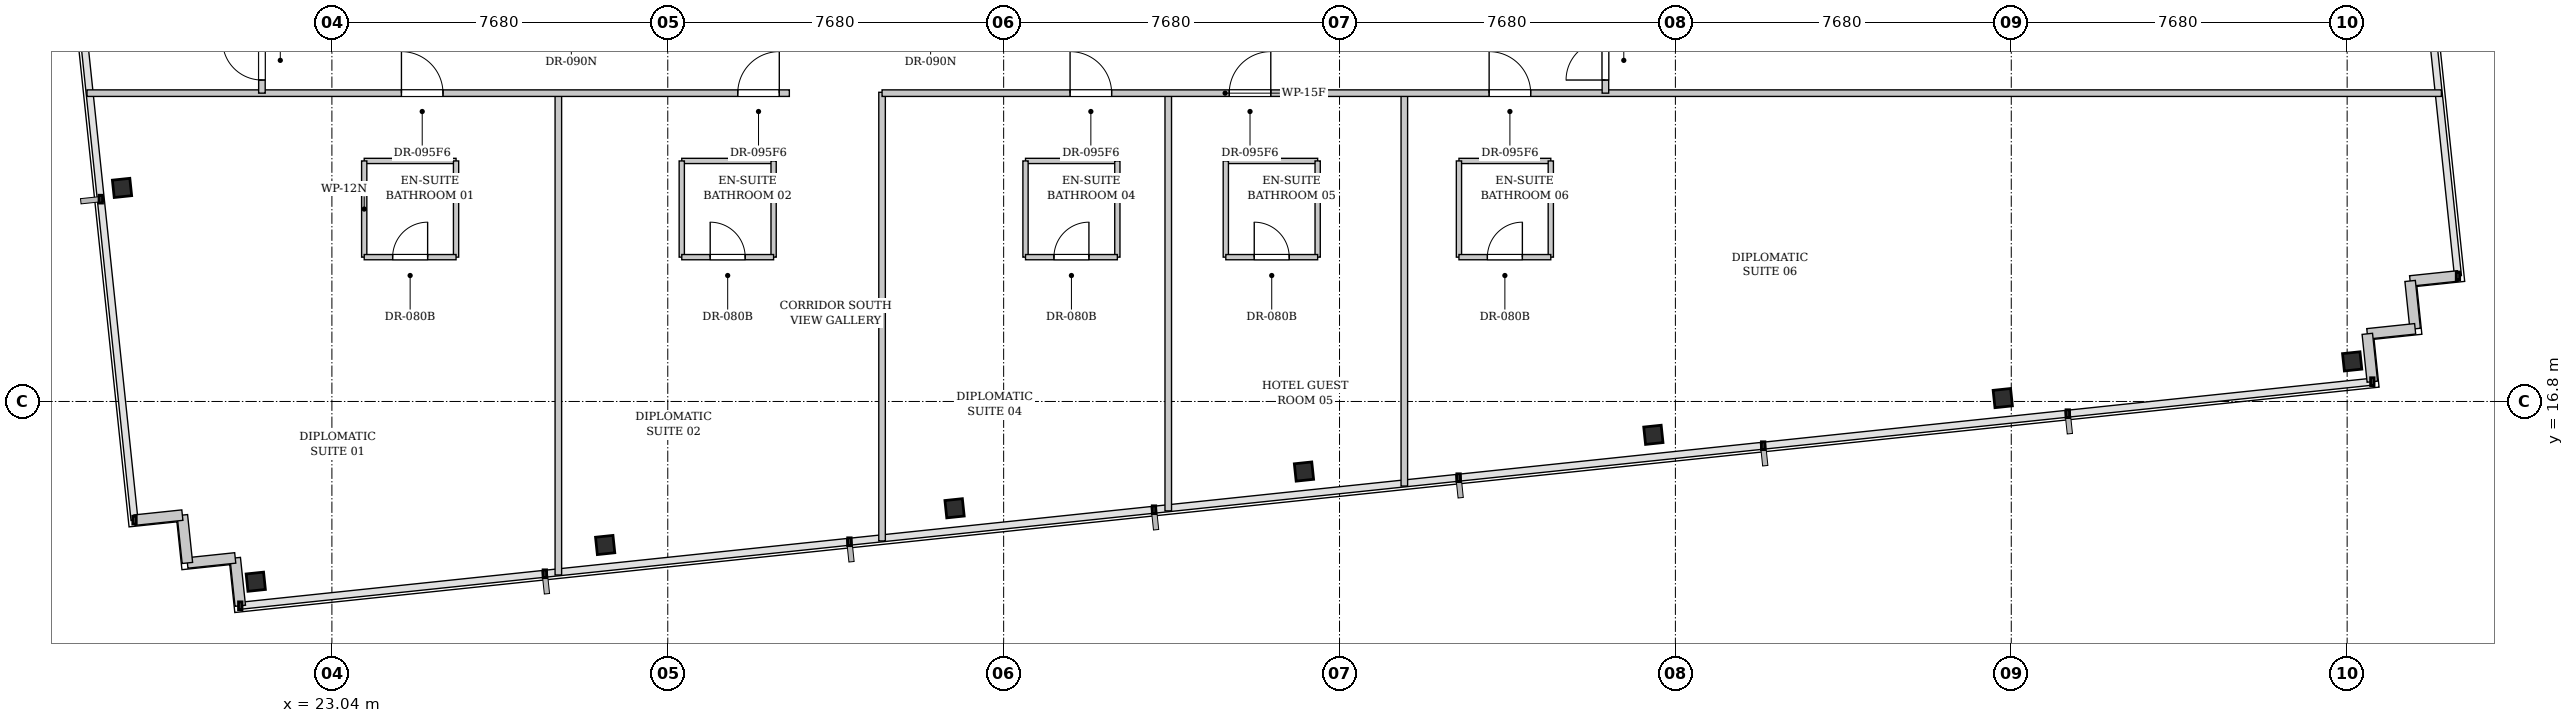
"""IFC4 building model, lengths in metres.
Left out: names, types, materials, properties, quantities, classifications, styles, units other than length and angle.
Written with IfcOpenShell. Run it as: python <this file> out.ifc"""

import sys

from ifc_helpers import new_model, si_unit, direction, frame, frame_2d, origin, origin_2d, place, context, subcontext, project, spatial, rectangle, i_section, extrude, element, fill, save


model = new_model("IFC4")
c1 = context("Model", 3, precision=1e-05, world=origin(), true_north=direction((0.0, 1.0)))
c2 = subcontext(c1, "Body", "Model", "MODEL_VIEW")
j1 = project(units=[si_unit("LENGTHUNIT", "METRE"), si_unit("PLANEANGLEUNIT", "RADIAN")], contexts=[c1])
p1 = place(None, origin())
s1 = spatial("IfcSite", under=j1, at=p1, CompositionType="ELEMENT")
p2 = place(p1, origin())
s2 = spatial("IfcBuilding", under=s1, at=p2, CompositionType="ELEMENT")
p3 = place(p2, frame((0.0, 0.0, 221.0)))
s3 = spatial("IfcBuildingStorey", under=s2, at=p3, CompositionType="ELEMENT", Elevation=221.0)
for number, where, z_axis, x_axis in (
    (1, (21.299, 12.678, 0.0), (0.0, 0.0, 1.0), (0.995, 0.105, 0.0)),
    (2, (29.288, 13.518, 0.0), (0.0, 0.0, 1.0), (0.995, 0.105, 0.0)),
    (3, (37.278, 14.358, 0.0), (0.0, 0.0, 1.0), (0.995, 0.105, 0.0)),
    (4, (45.267, 15.198, 0.0), (0.0, 0.0, 1.0), (0.995, 0.105, 0.0)),
    (5, (53.256, 16.037, 0.0), (0.0, 0.0, 1.0), (0.995, 0.105, 0.0)),
    (6, (61.246, 16.877, 0.0), (0.0, 0.0, 1.0), (0.995, 0.105, 0.0)),
    (7, (69.235, 17.717, 0.0), (0.0, 0.0, 1.0), (0.995, 0.105, 0.0)),
    (8, (18.241, 21.683, 0.0), (0.0, 0.0, 1.0), (0.995, 0.105, 0.0)),
):
    element("IfcColumn", number, at=place(p3, frame(where, z_axis=z_axis, x_axis=x_axis)), inside=s3, PredefinedType="COLUMN", context=c2, shape_type="SweptSolid", body=[
        extrude(i_section(OverallWidth=0.401, OverallDepth=0.399, WebThickness=0.025, FlangeThickness=0.04, FilletRadius=0.015, at=origin_2d()), origin(), (0.0, 0.0, 1.0), 3.3),
    ])
for number, where, z_axis, x_axis in (
    (9, (20.945, 12.128, 0.0), (0.0, 0.0, 1.0), (-0.105, 0.995, 0.0)),
    (10, (20.83, 13.222, 0.0), (0.0, 0.0, 1.0), (-0.995, -0.105, 0.0)),
    (11, (19.736, 13.107, 0.0), (0.0, 0.0, 1.0), (-0.105, 0.995, 0.0)),
    (12, (19.621, 14.201, 0.0), (0.0, 0.0, 1.0), (-0.995, -0.105, 0.0)),
    (13, (71.654, 19.67, 0.0), (0.0, 0.0, 1.0), (-0.995, -0.105, 0.0)),
    (14, (70.56, 19.555, 0.0), (0.0, 0.0, 1.0), (0.105, -0.995, 0.0)),
    (15, (70.675, 18.461, 0.0), (0.0, 0.0, 1.0), (-0.995, -0.105, 0.0)),
    (16, (69.581, 18.346, 0.0), (0.0, 0.0, 1.0), (0.105, -0.995, 0.0)),
):
    element("IfcWall", number, at=place(p3, frame(where, z_axis=z_axis, x_axis=x_axis)), inside=s3, PredefinedType="SOLIDWALL", context=c2, shape_type="SweptSolid", body=[
        extrude(rectangle(XDim=1.1, YDim=0.24, at=frame_2d((0.55, 0.0))), origin(), (0.0, 0.0, 1.0), 3.08),
    ])
p4 = place(p3, frame((23.779, 22.3, 0.0), z_axis=(0.0, 0.0, 1.0), x_axis=(1.0, 0.0, 0.0)))
e17 = element("IfcWall", 17, at=p4, inside=s3, PredefinedType="PARTITIONING", context=c2, shape_type="SweptSolid", body=[
    extrude(rectangle(XDim=2.1, YDim=0.12, at=frame_2d((1.05, 0.0))), origin(), (0.0, 0.0, 1.0), 3.08),
])
for number, where, z_axis, x_axis in (
    (18, (23.779, 20.1, 0.0), (0.0, 0.0, 1.0), (0.0, 1.0, 0.0)),
    (19, (25.879, 20.1, 0.0), (0.0, 0.0, 1.0), (0.0, 1.0, 0.0)),
):
    element("IfcWall", number, at=place(p3, frame(where, z_axis=z_axis, x_axis=x_axis)), inside=s3, PredefinedType="PARTITIONING", context=c2, shape_type="SweptSolid", body=[
        extrude(rectangle(XDim=2.2, YDim=0.12, at=frame_2d((1.1, 0.0))), origin(), (0.0, 0.0, 1.0), 3.08),
    ])
p5 = place(p3, frame((23.779, 20.1, 0.0), z_axis=(0.0, 0.0, 1.0), x_axis=(1.0, 0.0, 0.0)))
e20 = element("IfcWall", 20, at=p5, inside=s3, PredefinedType="PARTITIONING", context=c2, shape_type="SweptSolid", body=[
    extrude(rectangle(XDim=2.1, YDim=0.12, at=frame_2d((1.05, 0.0))), origin(), (0.0, 0.0, 1.0), 3.08),
])
p6 = place(p5, frame((0.65, 0.0, 0.0)))
e21 = element("IfcOpeningElement", 21, at=p6, cuts=e20, PredefinedType="OPENING", context=c2, shape_type="SweptSolid", body=[
    extrude(rectangle(XDim=0.8, YDim=2.1, at=frame_2d((0.4, 1.05))), frame((0.0, 0.07, 0.0), z_axis=(0.0, -1.0, 0.0), x_axis=(1.0, 0.0, 0.0)), (0.0, 0.0, 1.0), 0.14),
])
p7 = place(p3, frame((31.04, 22.3, 0.0), z_axis=(0.0, 0.0, 1.0), x_axis=(1.0, 0.0, 0.0)))
e22 = element("IfcWall", 22, at=p7, inside=s3, PredefinedType="PARTITIONING", context=c2, shape_type="SweptSolid", body=[
    extrude(rectangle(XDim=2.1, YDim=0.12, at=frame_2d((1.05, 0.0))), origin(), (0.0, 0.0, 1.0), 3.08),
])
for number, where, z_axis, x_axis in (
    (23, (31.04, 20.1, 0.0), (0.0, 0.0, 1.0), (0.0, 1.0, 0.0)),
    (24, (33.14, 20.1, 0.0), (0.0, 0.0, 1.0), (0.0, 1.0, 0.0)),
):
    element("IfcWall", number, at=place(p3, frame(where, z_axis=z_axis, x_axis=x_axis)), inside=s3, PredefinedType="PARTITIONING", context=c2, shape_type="SweptSolid", body=[
        extrude(rectangle(XDim=2.2, YDim=0.12, at=frame_2d((1.1, 0.0))), origin(), (0.0, 0.0, 1.0), 3.08),
    ])
p8 = place(p3, frame((31.04, 20.1, 0.0), z_axis=(0.0, 0.0, 1.0), x_axis=(1.0, 0.0, 0.0)))
e25 = element("IfcWall", 25, at=p8, inside=s3, PredefinedType="PARTITIONING", context=c2, shape_type="SweptSolid", body=[
    extrude(rectangle(XDim=2.1, YDim=0.12, at=frame_2d((1.05, 0.0))), origin(), (0.0, 0.0, 1.0), 3.08),
])
p9 = place(p8, frame((0.65, 0.0, 0.0)))
e26 = element("IfcOpeningElement", 26, at=p9, cuts=e25, PredefinedType="OPENING", context=c2, shape_type="SweptSolid", body=[
    extrude(rectangle(XDim=0.8, YDim=2.1, at=frame_2d((0.4, 1.05))), frame((0.0, 0.07, 0.0), z_axis=(0.0, -1.0, 0.0), x_axis=(1.0, 0.0, 0.0)), (0.0, 0.0, 1.0), 0.14),
])
p10 = place(p3, frame((28.218, 12.833, 0.0), z_axis=(0.0, 0.0, 1.0), x_axis=(0.0, 1.0, 0.0)))
e27 = element("IfcWall", 27, at=p10, inside=s3, PredefinedType="PARTITIONING", context=c2, shape_type="SweptSolid", body=[
    extrude(rectangle(XDim=11.038, YDim=0.15, at=frame_2d((5.519, 0.0))), origin(), (0.0, 0.0, 1.0), 3.08),
])
p11 = place(p3, frame((38.9, 22.3, 0.0), z_axis=(0.0, 0.0, 1.0), x_axis=(1.0, 0.0, 0.0)))
e28 = element("IfcWall", 28, at=p11, inside=s3, PredefinedType="PARTITIONING", context=c2, shape_type="SweptSolid", body=[
    extrude(rectangle(XDim=2.1, YDim=0.12, at=frame_2d((1.05, 0.0))), origin(), (0.0, 0.0, 1.0), 3.08),
])
for number, where, z_axis, x_axis in (
    (29, (38.9, 20.1, 0.0), (0.0, 0.0, 1.0), (0.0, 1.0, 0.0)),
    (30, (41.0, 20.1, 0.0), (0.0, 0.0, 1.0), (0.0, 1.0, 0.0)),
):
    element("IfcWall", number, at=place(p3, frame(where, z_axis=z_axis, x_axis=x_axis)), inside=s3, PredefinedType="PARTITIONING", context=c2, shape_type="SweptSolid", body=[
        extrude(rectangle(XDim=2.2, YDim=0.12, at=frame_2d((1.1, 0.0))), origin(), (0.0, 0.0, 1.0), 3.08),
    ])
p12 = place(p3, frame((38.9, 20.1, 0.0), z_axis=(0.0, 0.0, 1.0), x_axis=(1.0, 0.0, 0.0)))
e31 = element("IfcWall", 31, at=p12, inside=s3, PredefinedType="PARTITIONING", context=c2, shape_type="SweptSolid", body=[
    extrude(rectangle(XDim=2.1, YDim=0.12, at=frame_2d((1.05, 0.0))), origin(), (0.0, 0.0, 1.0), 3.08),
])
p13 = place(p12, frame((0.65, 0.0, 0.0)))
e32 = element("IfcOpeningElement", 32, at=p13, cuts=e31, PredefinedType="OPENING", context=c2, shape_type="SweptSolid", body=[
    extrude(rectangle(XDim=0.8, YDim=2.1, at=frame_2d((0.4, 1.05))), frame((0.0, 0.07, 0.0), z_axis=(0.0, -1.0, 0.0), x_axis=(1.0, 0.0, 0.0)), (0.0, 0.0, 1.0), 0.14),
])
p14 = place(p3, frame((35.62, 13.611, 0.0), z_axis=(0.0, 0.0, 1.0), x_axis=(0.0, 1.0, 0.0)))
e33 = element("IfcWall", 33, at=p14, inside=s3, PredefinedType="PARTITIONING", context=c2, shape_type="SweptSolid", body=[
    extrude(rectangle(XDim=10.26, YDim=0.15, at=frame_2d((5.13, 0.0))), origin(), (0.0, 0.0, 1.0), 3.08),
])
p15 = place(p3, frame((43.48, 22.3, 0.0), z_axis=(0.0, 0.0, 1.0), x_axis=(1.0, 0.0, 0.0)))
e34 = element("IfcWall", 34, at=p15, inside=s3, PredefinedType="PARTITIONING", context=c2, shape_type="SweptSolid", body=[
    extrude(rectangle(XDim=2.1, YDim=0.12, at=frame_2d((1.05, 0.0))), origin(), (0.0, 0.0, 1.0), 3.08),
])
p16 = place(p3, frame((43.48, 20.1, 0.0), z_axis=(0.0, 0.0, 1.0), x_axis=(0.0, 1.0, 0.0)))
e35 = element("IfcWall", 35, at=p16, inside=s3, PredefinedType="PARTITIONING", context=c2, shape_type="SweptSolid", body=[
    extrude(rectangle(XDim=2.2, YDim=0.12, at=frame_2d((1.1, 0.0))), origin(), (0.0, 0.0, 1.0), 3.08),
])
p17 = place(p3, frame((45.58, 20.1, 0.0), z_axis=(0.0, 0.0, 1.0), x_axis=(0.0, 1.0, 0.0)))
e36 = element("IfcWall", 36, at=p17, inside=s3, PredefinedType="PARTITIONING", context=c2, shape_type="SweptSolid", body=[
    extrude(rectangle(XDim=2.2, YDim=0.12, at=frame_2d((1.1, 0.0))), origin(), (0.0, 0.0, 1.0), 2.313),
])
p18 = place(p3, frame((43.48, 20.1, 0.0), z_axis=(0.0, 0.0, 1.0), x_axis=(1.0, 0.0, 0.0)))
e37 = element("IfcWall", 37, at=p18, inside=s3, PredefinedType="PARTITIONING", context=c2, shape_type="SweptSolid", body=[
    extrude(rectangle(XDim=2.1, YDim=0.12, at=frame_2d((1.05, 0.0))), origin(), (0.0, 0.0, 1.0), 3.08),
])
p19 = place(p18, frame((0.65, 0.0, 0.0)))
e38 = element("IfcOpeningElement", 38, at=p19, cuts=e37, PredefinedType="OPENING", context=c2, shape_type="SweptSolid", body=[
    extrude(rectangle(XDim=0.8, YDim=2.1, at=frame_2d((0.4, 1.05))), frame((0.0, 0.07, 0.0), z_axis=(0.0, -1.0, 0.0), x_axis=(1.0, 0.0, 0.0)), (0.0, 0.0, 1.0), 0.14),
])
p20 = place(p3, frame((42.164, 14.298, 0.0), z_axis=(0.0, 0.0, 1.0), x_axis=(0.0, 1.0, 0.0)))
e39 = element("IfcWall", 39, at=p20, inside=s3, PredefinedType="PARTITIONING", context=c2, shape_type="SweptSolid", body=[
    extrude(rectangle(XDim=9.572, YDim=0.15, at=frame_2d((4.786, 0.0))), origin(), (0.0, 0.0, 1.0), 3.08),
])
p21 = place(p3, frame((48.811, 22.3, 0.0), z_axis=(0.0, 0.0, 1.0), x_axis=(1.0, 0.0, 0.0)))
e40 = element("IfcWall", 40, at=p21, inside=s3, PredefinedType="PARTITIONING", context=c2, shape_type="SweptSolid", body=[
    extrude(rectangle(XDim=2.1, YDim=0.12, at=frame_2d((1.05, 0.0))), origin(), (0.0, 0.0, 1.0), 3.08),
])
for number, where, z_axis, x_axis in (
    (41, (48.811, 20.1, 0.0), (0.0, 0.0, 1.0), (0.0, 1.0, 0.0)),
    (42, (50.911, 20.1, 0.0), (0.0, 0.0, 1.0), (0.0, 1.0, 0.0)),
):
    element("IfcWall", number, at=place(p3, frame(where, z_axis=z_axis, x_axis=x_axis)), inside=s3, PredefinedType="PARTITIONING", context=c2, shape_type="SweptSolid", body=[
        extrude(rectangle(XDim=2.2, YDim=0.12, at=frame_2d((1.1, 0.0))), origin(), (0.0, 0.0, 1.0), 3.08),
    ])
p22 = place(p3, frame((48.811, 20.1, 0.0), z_axis=(0.0, 0.0, 1.0), x_axis=(1.0, 0.0, 0.0)))
e43 = element("IfcWall", 43, at=p22, inside=s3, PredefinedType="PARTITIONING", context=c2, shape_type="SweptSolid", body=[
    extrude(rectangle(XDim=2.1, YDim=0.12, at=frame_2d((1.05, 0.0))), origin(), (0.0, 0.0, 1.0), 3.08),
])
p23 = place(p22, frame((0.65, 0.0, 0.0)))
e44 = element("IfcOpeningElement", 44, at=p23, cuts=e43, PredefinedType="OPENING", context=c2, shape_type="SweptSolid", body=[
    extrude(rectangle(XDim=0.8, YDim=2.1, at=frame_2d((0.4, 1.05))), frame((0.0, 0.07, 0.0), z_axis=(0.0, -1.0, 0.0), x_axis=(1.0, 0.0, 0.0)), (0.0, 0.0, 1.0), 0.14),
])
p24 = place(p3, frame((47.562, 14.866, 0.0), z_axis=(0.0, 0.0, 1.0), x_axis=(0.0, 1.0, 0.0)))
e45 = element("IfcWall", 45, at=p24, inside=s3, PredefinedType="PARTITIONING", context=c2, shape_type="SweptSolid", body=[
    extrude(rectangle(XDim=9.004, YDim=0.15, at=frame_2d((4.502, 0.0))), origin(), (0.0, 0.0, 1.0), 3.08),
])
p25 = place(p3, frame((17.44, 23.85, 0.0), z_axis=(0.0, 0.0, 1.0), x_axis=(1.0, 0.0, 0.0)))
e46 = element("IfcWall", 46, at=p25, inside=s3, PredefinedType="PARTITIONING", context=c2, shape_type="SweptSolid", body=[
    extrude(rectangle(XDim=16.06, YDim=0.15, at=frame_2d((8.03, 0.0))), origin(), (0.0, 0.0, 1.0), 3.08),
])
p26 = place(p25, frame((7.19, 0.0, 0.0)))
e47 = element("IfcOpeningElement", 47, at=p26, cuts=e46, PredefinedType="OPENING", context=c2, shape_type="SweptSolid", body=[
    extrude(rectangle(XDim=0.95, YDim=2.15, at=frame_2d((0.475, 1.075))), frame((0.0, 0.085, 0.0), z_axis=(0.0, -1.0, 0.0), x_axis=(1.0, 0.0, 0.0)), (0.0, 0.0, 1.0), 0.17),
])
p27 = place(p25, frame((14.88, 0.0, 0.0)))
e48 = element("IfcOpeningElement", 48, at=p27, cuts=e46, PredefinedType="OPENING", context=c2, shape_type="SweptSolid", body=[
    extrude(rectangle(XDim=0.95, YDim=2.15, at=frame_2d((0.475, 1.075))), frame((0.0, 0.085, 0.0), z_axis=(0.0, -1.0, 0.0), x_axis=(1.0, 0.0, 0.0)), (0.0, 0.0, 1.0), 0.17),
])
p28 = place(p3, frame((35.62, 23.85, 0.0), z_axis=(0.0, 0.0, 1.0), x_axis=(1.0, 0.0, 0.0)))
e49 = element("IfcWall", 49, at=p28, inside=s3, PredefinedType="PARTITIONING", context=c2, shape_type="SweptSolid", body=[
    extrude(rectangle(XDim=35.655, YDim=0.15, at=frame_2d((17.828, 0.0))), origin(), (0.0, 0.0, 1.0), 3.08),
])
p29 = place(p28, frame((4.299, 0.0, 0.0)))
e50 = element("IfcOpeningElement", 50, at=p29, cuts=e49, PredefinedType="OPENING", context=c2, shape_type="SweptSolid", body=[
    extrude(rectangle(XDim=0.95, YDim=2.15, at=frame_2d((0.475, 1.075))), frame((0.0, 0.085, 0.0), z_axis=(0.0, -1.0, 0.0), x_axis=(1.0, 0.0, 0.0)), (0.0, 0.0, 1.0), 0.17),
])
p30 = place(p28, frame((7.938, 0.0, 0.0)))
e51 = element("IfcOpeningElement", 51, at=p30, cuts=e49, PredefinedType="OPENING", context=c2, shape_type="SweptSolid", body=[
    extrude(rectangle(XDim=0.95, YDim=2.15, at=frame_2d((0.475, 1.075))), frame((0.0, 0.085, 0.0), z_axis=(0.0, -1.0, 0.0), x_axis=(1.0, 0.0, 0.0)), (0.0, 0.0, 1.0), 0.17),
])
p31 = place(p28, frame((13.881, 0.0, 0.0)))
e52 = element("IfcOpeningElement", 52, at=p31, cuts=e49, PredefinedType="OPENING", context=c2, shape_type="SweptSolid", body=[
    extrude(rectangle(XDim=0.95, YDim=2.15, at=frame_2d((0.475, 1.075))), frame((0.0, 0.085, 0.0), z_axis=(0.0, -1.0, 0.0), x_axis=(1.0, 0.0, 0.0)), (0.0, 0.0, 1.0), 0.17),
])
p32 = place(p3, frame((21.44, 23.85, 0.0), z_axis=(0.0, 0.0, 1.0), x_axis=(0.0, 1.0, 0.0)))
e53 = element("IfcWall", 53, at=p32, inside=s3, PredefinedType="PARTITIONING", context=c2, shape_type="SweptSolid", body=[
    extrude(rectangle(XDim=22.498, YDim=0.15, at=frame_2d((11.249, 0.0))), origin(), (0.0, 0.0, 1.0), 3.08),
])
p33 = place(p32, frame((0.3, 0.0, 0.0)))
e54 = element("IfcOpeningElement", 54, at=p33, cuts=e53, PredefinedType="OPENING", context=c2, shape_type="SweptSolid", body=[
    extrude(rectangle(XDim=0.9, YDim=2.15, at=frame_2d((0.45, 1.075))), frame((0.0, 0.085, 0.0), z_axis=(0.0, -1.0, 0.0), x_axis=(1.0, 0.0, 0.0)), (0.0, 0.0, 1.0), 0.17),
])
p34 = place(p3, frame((52.16, 23.85, 0.0), z_axis=(0.0, 0.0, 1.0), x_axis=(0.0, 1.0, 0.0)))
e55 = element("IfcWall", 55, at=p34, inside=s3, PredefinedType="PARTITIONING", context=c2, shape_type="SweptSolid", body=[
    extrude(rectangle(XDim=11.29, YDim=0.15, at=frame_2d((5.645, 0.0))), origin(), (0.0, 0.0, 1.0), 3.08),
])
p35 = place(p34, frame((0.3, 0.0, 0.0)))
e56 = element("IfcOpeningElement", 56, at=p35, cuts=e55, PredefinedType="OPENING", context=c2, shape_type="SweptSolid", body=[
    extrude(rectangle(XDim=0.9, YDim=2.15, at=frame_2d((0.45, 1.075))), frame((0.0, 0.085, 0.0), z_axis=(0.0, -1.0, 0.0), x_axis=(1.0, 0.0, 0.0)), (0.0, 0.0, 1.0), 0.17),
])
p36 = place(p6, origin())
e57 = element("IfcDoor", 57, at=p36, inside=s3, OperationType="SINGLE_SWING_RIGHT", PredefinedType="DOOR", context=c2, shape_type="SweptSolid", body=[
    extrude(rectangle(XDim=0.8, YDim=2.1, at=frame_2d((0.4, 1.05))), frame((0.0, 0.025, 0.0), z_axis=(0.0, -1.0, 0.0), x_axis=(1.0, 0.0, 0.0)), (0.0, 0.0, 1.0), 0.05),
])
fill(e21, e57)
p37 = place(p9, origin())
e58 = element("IfcDoor", 58, at=p37, inside=s3, OperationType="SINGLE_SWING_LEFT", PredefinedType="DOOR", context=c2, shape_type="SweptSolid", body=[
    extrude(rectangle(XDim=0.8, YDim=2.1, at=frame_2d((0.4, 1.05))), frame((0.0, 0.025, 0.0), z_axis=(0.0, -1.0, 0.0), x_axis=(1.0, 0.0, 0.0)), (0.0, 0.0, 1.0), 0.05),
])
fill(e26, e58)
p38 = place(p13, origin())
e59 = element("IfcDoor", 59, at=p38, inside=s3, OperationType="SINGLE_SWING_RIGHT", PredefinedType="DOOR", context=c2, shape_type="SweptSolid", body=[
    extrude(rectangle(XDim=0.8, YDim=2.1, at=frame_2d((0.4, 1.05))), frame((0.0, 0.025, 0.0), z_axis=(0.0, -1.0, 0.0), x_axis=(1.0, 0.0, 0.0)), (0.0, 0.0, 1.0), 0.05),
])
fill(e32, e59)
p39 = place(p19, origin())
e60 = element("IfcDoor", 60, at=p39, inside=s3, OperationType="SINGLE_SWING_LEFT", PredefinedType="DOOR", context=c2, shape_type="SweptSolid", body=[
    extrude(rectangle(XDim=0.8, YDim=2.1, at=frame_2d((0.4, 1.05))), frame((0.0, 0.025, 0.0), z_axis=(0.0, -1.0, 0.0), x_axis=(1.0, 0.0, 0.0)), (0.0, 0.0, 1.0), 0.05),
])
fill(e38, e60)
p40 = place(p23, origin())
e61 = element("IfcDoor", 61, at=p40, inside=s3, OperationType="SINGLE_SWING_RIGHT", PredefinedType="DOOR", context=c2, shape_type="SweptSolid", body=[
    extrude(rectangle(XDim=0.8, YDim=2.1, at=frame_2d((0.4, 1.05))), frame((0.0, 0.025, 0.0), z_axis=(0.0, -1.0, 0.0), x_axis=(1.0, 0.0, 0.0)), (0.0, 0.0, 1.0), 0.05),
])
fill(e44, e61)
p41 = place(p26, origin())
e62 = element("IfcDoor", 62, at=p41, inside=s3, OperationType="SINGLE_SWING_LEFT", PredefinedType="DOOR", context=c2, shape_type="SweptSolid", body=[
    extrude(rectangle(XDim=0.95, YDim=2.15, at=frame_2d((0.475, 1.075))), frame((0.0, 0.025, 0.0), z_axis=(0.0, -1.0, 0.0), x_axis=(1.0, 0.0, 0.0)), (0.0, 0.0, 1.0), 0.05),
])
fill(e47, e62)
p42 = place(p27, origin())
e63 = element("IfcDoor", 63, at=p42, inside=s3, OperationType="SINGLE_SWING_RIGHT", PredefinedType="DOOR", context=c2, shape_type="SweptSolid", body=[
    extrude(rectangle(XDim=0.95, YDim=2.15, at=frame_2d((0.475, 1.075))), frame((0.0, 0.025, 0.0), z_axis=(0.0, -1.0, 0.0), x_axis=(1.0, 0.0, 0.0)), (0.0, 0.0, 1.0), 0.05),
])
fill(e48, e63)
p43 = place(p29, origin())
e64 = element("IfcDoor", 64, at=p43, inside=s3, OperationType="SINGLE_SWING_LEFT", PredefinedType="DOOR", context=c2, shape_type="SweptSolid", body=[
    extrude(rectangle(XDim=0.95, YDim=2.15, at=frame_2d((0.475, 1.075))), frame((0.0, 0.025, 0.0), z_axis=(0.0, -1.0, 0.0), x_axis=(1.0, 0.0, 0.0)), (0.0, 0.0, 1.0), 0.05),
])
fill(e50, e64)
p44 = place(p30, origin())
e65 = element("IfcDoor", 65, at=p44, inside=s3, OperationType="SINGLE_SWING_RIGHT", PredefinedType="DOOR", context=c2, shape_type="SweptSolid", body=[
    extrude(rectangle(XDim=0.95, YDim=2.15, at=frame_2d((0.475, 1.075))), frame((0.0, 0.025, 0.0), z_axis=(0.0, -1.0, 0.0), x_axis=(1.0, 0.0, 0.0)), (0.0, 0.0, 1.0), 0.05),
])
fill(e51, e65)
p45 = place(p31, origin())
e66 = element("IfcDoor", 66, at=p45, inside=s3, OperationType="SINGLE_SWING_LEFT", PredefinedType="DOOR", context=c2, shape_type="SweptSolid", body=[
    extrude(rectangle(XDim=0.95, YDim=2.15, at=frame_2d((0.475, 1.075))), frame((0.0, 0.025, 0.0), z_axis=(0.0, -1.0, 0.0), x_axis=(1.0, 0.0, 0.0)), (0.0, 0.0, 1.0), 0.05),
])
fill(e52, e66)
p46 = place(p33, origin())
e67 = element("IfcDoor", 67, at=p46, inside=s3, OperationType="SINGLE_SWING_RIGHT", PredefinedType="DOOR", context=c2, shape_type="SweptSolid", body=[
    extrude(rectangle(XDim=0.9, YDim=2.15, at=frame_2d((0.45, 1.075))), frame((0.0, 0.025, 0.0), z_axis=(0.0, -1.0, 0.0), x_axis=(1.0, 0.0, 0.0)), (0.0, 0.0, 1.0), 0.05),
])
fill(e54, e67)
p47 = place(p35, origin())
e68 = element("IfcDoor", 68, at=p47, inside=s3, OperationType="SINGLE_SWING_LEFT", PredefinedType="DOOR", context=c2, shape_type="SweptSolid", body=[
    extrude(rectangle(XDim=0.9, YDim=2.15, at=frame_2d((0.45, 1.075))), frame((0.0, 0.025, 0.0), z_axis=(0.0, -1.0, 0.0), x_axis=(1.0, 0.0, 0.0)), (0.0, 0.0, 1.0), 0.05),
])
fill(e56, e68)
save(model, sys.argv[1])
